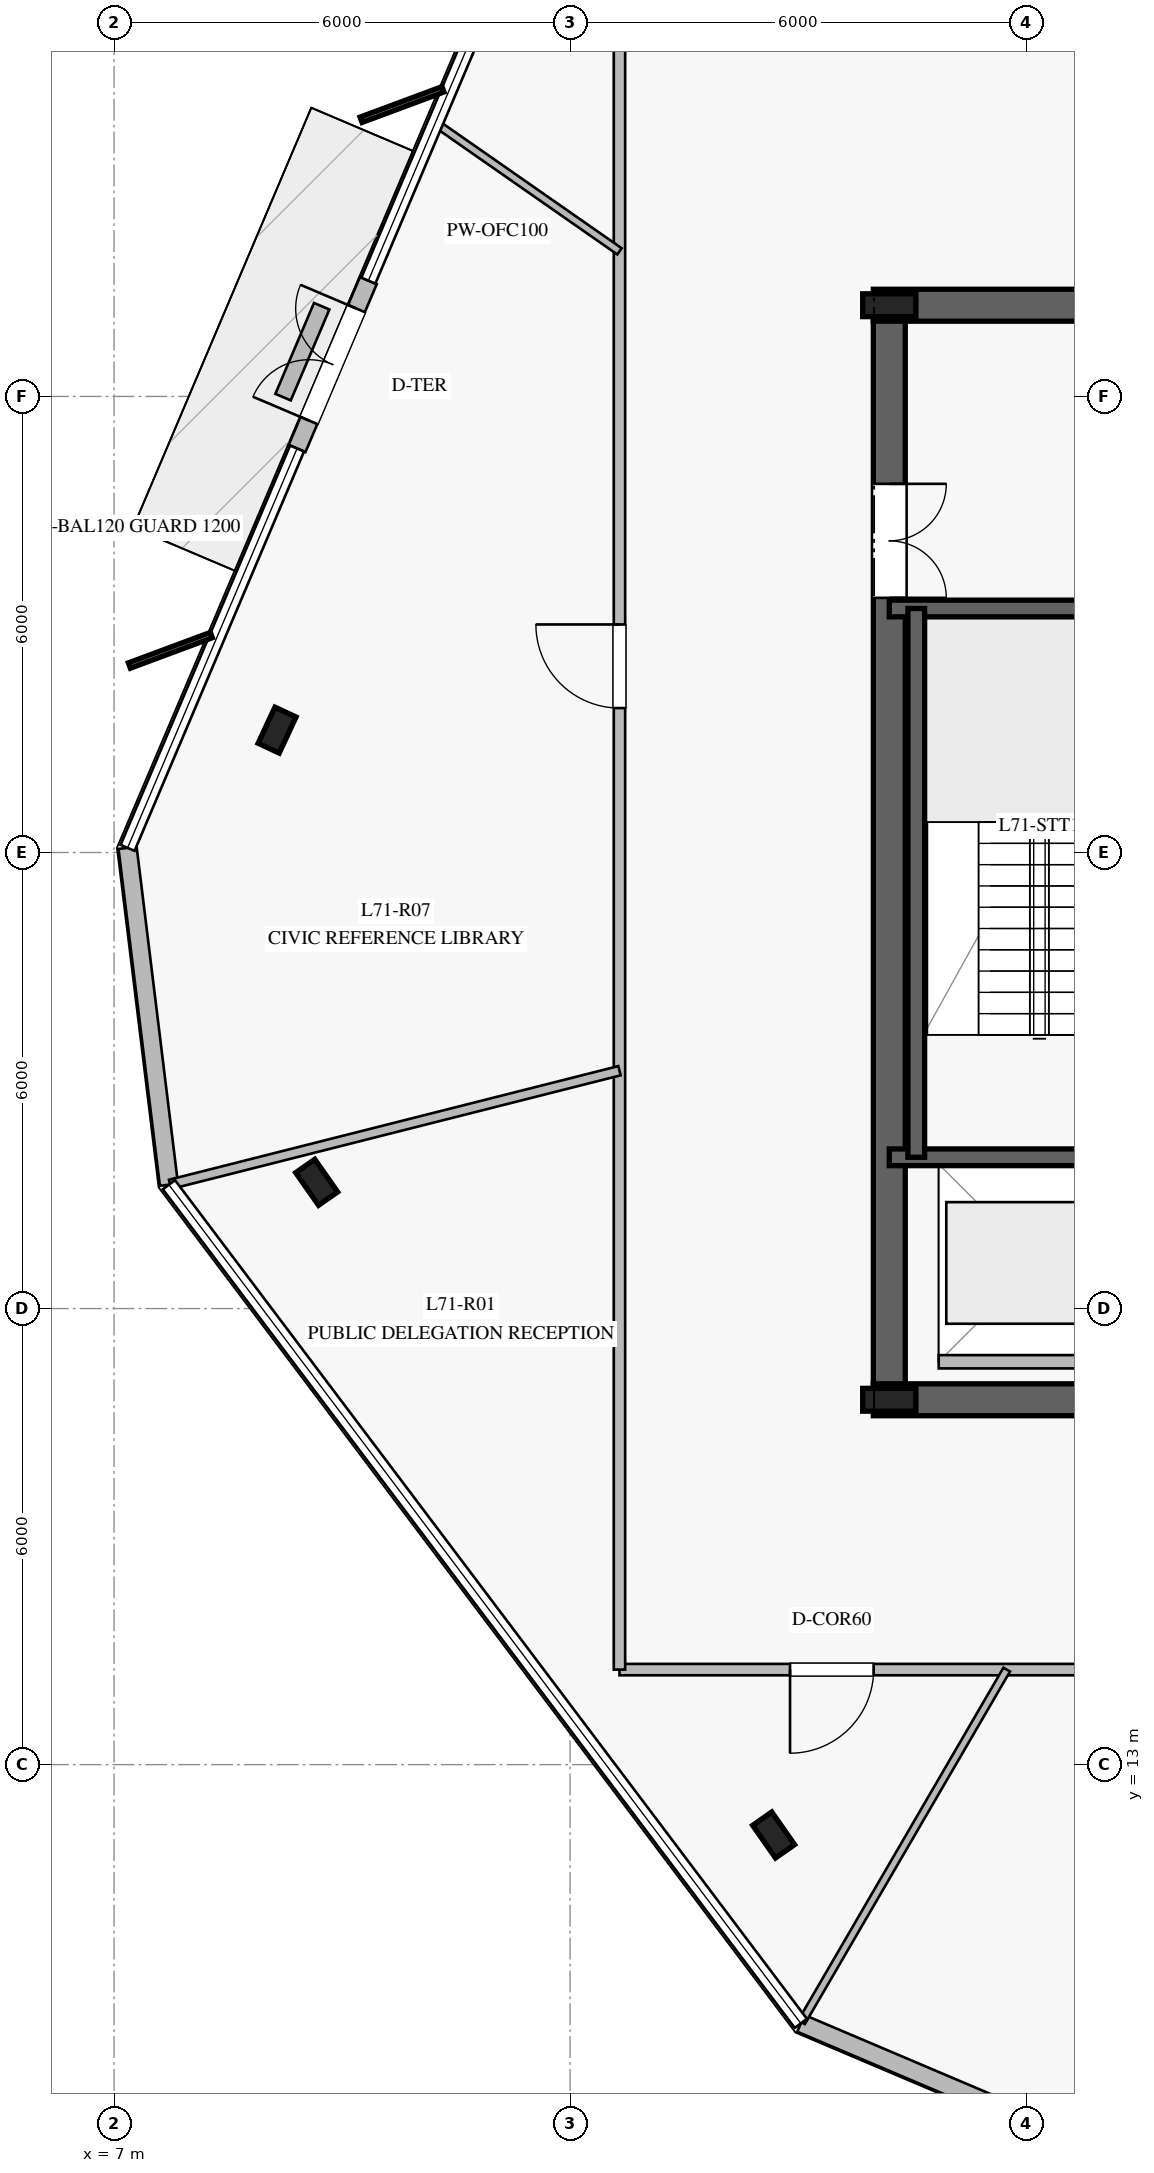
"""IFC4 building model, lengths in metres.
Left out: names, types, materials, properties, quantities, classifications, styles, units other than length and angle.
Written with IfcOpenShell. Run it as: python <this file> out.ifc"""

import sys

from ifc_helpers import new_model, si_unit, direction, frame, frame_2d, origin, origin_2d, place, context, subcontext, project, spatial, rectangle, i_section, extrude, element, fill, save


model = new_model("IFC4")
c1 = context("Model", 3, precision=1e-05, world=origin(), true_north=direction((0.0, 1.0)))
c2 = subcontext(c1, "Body", "Model", "MODEL_VIEW")
j1 = project(units=[si_unit("LENGTHUNIT", "METRE"), si_unit("PLANEANGLEUNIT", "RADIAN")], contexts=[c1])
p1 = place(None, origin())
s1 = spatial("IfcSite", under=j1, at=p1, CompositionType="ELEMENT")
p2 = place(p1, origin())
s2 = spatial("IfcBuilding", under=s1, at=p2, CompositionType="ELEMENT")
p3 = place(p2, frame((0.0, 0.0, 294.2)))
s3 = spatial("IfcBuildingStorey", under=s2, at=p3, CompositionType="ELEMENT", Elevation=294.2)
p4 = place(p3, frame((16.99, 17.8, 0.0), z_axis=(0.0, 0.0, 1.0), x_axis=(1.0, 0.0, 0.0)))
e1 = element("IfcWall", 1, at=p4, inside=s3, PredefinedType="SHEAR", context=c2, shape_type="SweptSolid", body=[
    extrude(rectangle(XDim=16.02, YDim=0.42, at=frame_2d((8.01, 0.0))), origin(), (0.0, 0.0, 1.0), 3.78),
])
p5 = place(p4, frame((4.96, 0.0, 0.0)))
e2 = element("IfcOpeningElement", 2, at=p5, cuts=e1, PredefinedType="OPENING", context=c2, shape_type="SweptSolid", body=[
    extrude(rectangle(XDim=1.2, YDim=2.25, at=frame_2d((0.6, 1.125))), frame((0.0, 0.22, 0.0), z_axis=(0.0, -1.0, 0.0), x_axis=(1.0, 0.0, 0.0)), (0.0, 0.0, 1.0), 0.44),
])
p6 = place(p4, frame((13.91, 0.0, 0.0)))
e3 = element("IfcOpeningElement", 3, at=p6, cuts=e1, PredefinedType="OPENING", context=c2, shape_type="SweptSolid", body=[
    extrude(rectangle(XDim=0.9, YDim=2.1, at=frame_2d((0.45, 1.05))), frame((0.0, 0.22, 0.0), z_axis=(0.0, -1.0, 0.0), x_axis=(1.0, 0.0, 0.0)), (0.0, 0.0, 1.0), 0.44),
])
p7 = place(p4, frame((9.16, 0.0, 0.0)))
e4 = element("IfcOpeningElement", 4, at=p7, cuts=e1, PredefinedType="OPENING", context=c2, shape_type="SweptSolid", body=[
    extrude(rectangle(XDim=1.1, YDim=2.2, at=frame_2d((0.55, 1.1))), frame((0.0, 0.22, 0.0), z_axis=(0.0, -1.0, 0.0), x_axis=(1.0, 0.0, 0.0)), (0.0, 0.0, 1.0), 0.44),
])
p8 = place(p3, frame((33.01, 32.2, 0.0), z_axis=(0.0, 0.0, 1.0), x_axis=(-1.0, 0.0, 0.0)))
e5 = element("IfcWall", 5, at=p8, inside=s3, PredefinedType="SHEAR", context=c2, shape_type="SweptSolid", body=[
    extrude(rectangle(XDim=16.02, YDim=0.42, at=frame_2d((8.01, 0.0))), origin(), (0.0, 0.0, 1.0), 3.78),
])
p9 = place(p8, frame((4.96, 0.0, 0.0)))
e6 = element("IfcOpeningElement", 6, at=p9, cuts=e5, PredefinedType="OPENING", context=c2, shape_type="SweptSolid", body=[
    extrude(rectangle(XDim=1.2, YDim=2.25, at=frame_2d((0.6, 1.125))), frame((0.0, 0.22, 0.0), z_axis=(0.0, -1.0, 0.0), x_axis=(1.0, 0.0, 0.0)), (0.0, 0.0, 1.0), 0.44),
])
p10 = place(p8, frame((9.785, 0.0, 0.0)))
e7 = element("IfcOpeningElement", 7, at=p10, cuts=e5, PredefinedType="OPENING", context=c2, shape_type="SweptSolid", body=[
    extrude(rectangle(XDim=1.1, YDim=2.2, at=frame_2d((0.55, 1.1))), frame((0.0, 0.22, 0.0), z_axis=(0.0, -1.0, 0.0), x_axis=(1.0, 0.0, 0.0)), (0.0, 0.0, 1.0), 0.44),
])
p11 = place(p3, frame((17.2, 31.99, 0.0), z_axis=(0.0, 0.0, 1.0), x_axis=(0.0, -1.0, 0.0)))
e8 = element("IfcWall", 8, at=p11, inside=s3, PredefinedType="SHEAR", context=c2, shape_type="SweptSolid", body=[
    extrude(rectangle(XDim=13.98, YDim=0.42, at=frame_2d((6.99, 0.0))), origin(), (0.0, 0.0, 1.0), 3.78),
])
p12 = place(p11, frame((2.14, 0.0, 0.0)))
e9 = element("IfcOpeningElement", 9, at=p12, cuts=e8, PredefinedType="OPENING", context=c2, shape_type="SweptSolid", body=[
    extrude(rectangle(XDim=1.5, YDim=2.2, at=frame_2d((0.75, 1.1))), frame((0.0, 0.22, 0.0), z_axis=(0.0, -1.0, 0.0), x_axis=(1.0, 0.0, 0.0)), (0.0, 0.0, 1.0), 0.44),
])
for number, where, z_axis, x_axis in (
    (10, (17.2, 17.8, 0.0), (0.0, 0.0, 1.0), (1.0, 0.0, 0.0)),
    (11, (17.2, 32.2, 0.0), (0.0, 0.0, 1.0), (1.0, 0.0, 0.0)),
):
    element("IfcColumn", number, at=place(p3, frame(where, z_axis=z_axis, x_axis=x_axis)), inside=s3, PredefinedType="COLUMN", context=c2, shape_type="SweptSolid", body=[
        extrude(i_section(OverallWidth=0.3, OverallDepth=0.7, WebThickness=0.017, FlangeThickness=0.032, at=origin_2d()), origin(), (0.0, 0.0, 1.0), 4.0),
    ])
for number, where, z_axis, x_axis in (
    (12, (17.2, 20.99, 0.0), (0.0, 0.0, 1.0), (1.0, 0.0, 0.0)),
    (13, (17.2, 28.21, 0.0), (0.0, 0.0, 1.0), (1.0, 0.0, 0.0)),
):
    element("IfcWall", number, at=place(p3, frame(where, z_axis=z_axis, x_axis=x_axis)), inside=s3, PredefinedType="SOLIDWALL", context=c2, shape_type="SweptSolid", body=[
        extrude(rectangle(XDim=3.72, YDim=0.22, at=frame_2d((1.86, 0.0))), origin(), (0.0, 0.0, 1.0), 3.78),
    ])
p13 = place(p3, frame((17.555, 28.21, 0.0), z_axis=(0.0, 0.0, 1.0), x_axis=(0.0, -1.0, 0.0)))
e14 = element("IfcWall", 14, at=p13, inside=s3, PredefinedType="SOLIDWALL", context=c2, shape_type="SweptSolid", body=[
    extrude(rectangle(XDim=7.22, YDim=0.22, at=frame_2d((3.61, 0.0))), origin(), (0.0, 0.0, 1.0), 3.78),
])
for number, where, z_axis, x_axis in (
    (15, (9.145, 26.61, 0.0), (0.0, 0.0, 1.0), (0.423, 0.906, 0.0)),
    (16, (9.666, 20.661, 0.0), (0.0, 0.0, 1.0), (-0.574, 0.819, 0.0)),
    (17, (15.678, 12.074, 0.0), (0.0, 0.0, 1.0), (-0.574, 0.819, 0.0)),
):
    element("IfcColumn", number, at=place(p3, frame(where, z_axis=z_axis, x_axis=x_axis)), inside=s3, PredefinedType="COLUMN", context=c2, shape_type="SweptSolid", body=[
        extrude(i_section(OverallWidth=0.306, OverallDepth=0.524, WebThickness=0.021, FlangeThickness=0.04, at=origin_2d()), origin(), (0.0, 0.0, 1.0), 4.0),
    ])
p14 = place(p3, frame((10.346, 32.524, 0.0), z_axis=(0.0, 0.0, 1.0), x_axis=(-0.390847654615, -0.920455382342, 0.0)))
e18 = element("IfcWall", 18, at=p14, inside=s3, PredefinedType="STANDARD", context=c2, shape_type="SweptSolid", body=[
    extrude(rectangle(XDim=2.4, YDim=0.24, at=frame_2d((1.2, 0.0))), origin(), (0.0, 0.0, 1.0), 3.78),
])
p15 = place(p14, frame((0.4, 0.0, 0.0)))
e19 = element("IfcOpeningElement", 19, at=p15, cuts=e18, PredefinedType="OPENING", context=c2, shape_type="SweptSolid", body=[
    extrude(rectangle(XDim=1.6, YDim=2.25, at=frame_2d((0.8, 1.125))), frame((0.0, 0.13, 0.0), z_axis=(0.0, -1.0, 0.0), x_axis=(1.0, 0.0, 0.0)), (0.0, 0.0, 1.0), 0.26),
])
p16 = place(p3, frame((7.178, 25.061, 0.0), z_axis=(0.0, 0.0, 1.0), x_axis=(0.121813815836, -0.992552967993, 0.0)))
e20 = element("IfcWall", 20, at=p16, inside=s3, PredefinedType="STANDARD", context=c2, shape_type="SweptSolid", body=[
    extrude(rectangle(XDim=4.465, YDim=0.24, at=frame_2d((2.233, 0.0))), origin(), (0.0, 0.0, 1.0), 3.78),
])
p17 = place(p3, frame((16.036, 9.596, 0.0), z_axis=(0.0, 0.0, 1.0), x_axis=(0.92048584613, -0.390775903908, 0.0)))
e21 = element("IfcWall", 21, at=p17, inside=s3, PredefinedType="STANDARD", context=c2, shape_type="SweptSolid", body=[
    extrude(rectangle(XDim=4.465, YDim=0.24, at=frame_2d((2.232, 0.0))), origin(), (0.0, 0.0, 1.0), 3.78),
])
p18 = place(p3, frame((9.732, 32.187, 0.0), z_axis=(0.0, 0.0, 1.0), x_axis=(-0.390810390969, -0.920471204498, 0.0)))
e22 = element("IfcWall", 22, at=p18, inside=s3, PredefinedType="USERDEFINED", context=c2, shape_type="SweptSolid", body=[
    extrude(rectangle(XDim=1.299, YDim=0.22, at=frame_2d((0.65, 0.0))), origin(), (0.0, 0.0, 1.0), 0.4),
])
p19 = place(p3, frame((17.85, 18.3, 0.0), z_axis=(0.0, 0.0, 1.0), x_axis=(1.0, 0.0, 0.0)))
e23 = element("IfcWall", 23, at=p19, inside=s3, PredefinedType="PARTITIONING", context=c2, shape_type="SweptSolid", body=[
    extrude(rectangle(XDim=2.6, YDim=0.175, at=frame_2d((1.3, 0.0))), origin(), (0.0, 0.0, 1.0), 3.78),
])
p20 = place(p3, frame((36.35, 14.25, 0.0), z_axis=(0.0, 0.0, 1.0), x_axis=(-1.0, 0.0, 0.0)))
e24 = element("IfcWall", 24, at=p20, inside=s3, PredefinedType="PARTITIONING", context=c2, shape_type="SweptSolid", body=[
    extrude(rectangle(XDim=22.7, YDim=0.15, at=frame_2d((11.35, 0.0))), origin(), (0.0, 0.0, 1.0), 3.28),
])
p21 = place(p20, frame((19.356, 0.0, 0.0)))
e25 = element("IfcOpeningElement", 25, at=p21, cuts=e24, PredefinedType="OPENING", context=c2, shape_type="SweptSolid", body=[
    extrude(rectangle(XDim=1.1, YDim=2.2, at=frame_2d((0.55, 1.1))), frame((0.0, 0.085, 0.0), z_axis=(0.0, -1.0, 0.0), x_axis=(1.0, 0.0, 0.0)), (0.0, 0.0, 1.0), 0.17),
])
p22 = place(p20, frame((10.849, 0.0, 0.0)))
e26 = element("IfcOpeningElement", 26, at=p22, cuts=e24, PredefinedType="OPENING", context=c2, shape_type="SweptSolid", body=[
    extrude(rectangle(XDim=1.1, YDim=2.2, at=frame_2d((0.55, 1.1))), frame((0.0, 0.085, 0.0), z_axis=(0.0, -1.0, 0.0), x_axis=(1.0, 0.0, 0.0)), (0.0, 0.0, 1.0), 0.17),
])
p23 = place(p3, frame((13.65, 14.25, 0.0), z_axis=(0.0, 0.0, 1.0), x_axis=(0.0, 1.0, 0.0)))
e27 = element("IfcWall", 27, at=p23, inside=s3, PredefinedType="PARTITIONING", context=c2, shape_type="SweptSolid", body=[
    extrude(rectangle(XDim=21.5, YDim=0.15, at=frame_2d((10.75, 0.0))), origin(), (0.0, 0.0, 1.0), 3.05),
])
p24 = place(p23, frame((12.65, 0.0, 0.0)))
e28 = element("IfcOpeningElement", 28, at=p24, cuts=e27, PredefinedType="OPENING", context=c2, shape_type="SweptSolid", body=[
    extrude(rectangle(XDim=1.1, YDim=2.2, at=frame_2d((0.55, 1.1))), frame((0.0, 0.085, 0.0), z_axis=(0.0, -1.0, 0.0), x_axis=(1.0, 0.0, 0.0)), (0.0, 0.0, 1.0), 0.17),
])
p25 = place(p3, frame((13.65, 32.909, 0.0), z_axis=(0.0, 0.0, 1.0), x_axis=(-0.820311921153, 0.57191638551, 0.0)))
e29 = element("IfcWall", 29, at=p25, inside=s3, PredefinedType="MOVABLE", context=c2, shape_type="SweptSolid", body=[
    extrude(rectangle(XDim=2.938, YDim=0.1, at=frame_2d((1.469, 0.0))), origin(), (0.0, 0.0, 1.0), 3.28),
])
p26 = place(p3, frame((13.65, 22.129, 0.0), z_axis=(0.0, 0.0, 1.0), x_axis=(-0.969486629442, -0.245144192941, 0.0)))
e30 = element("IfcWall", 30, at=p26, inside=s3, PredefinedType="PARTITIONING", context=c2, shape_type="SweptSolid", body=[
    extrude(rectangle(XDim=6.098, YDim=0.125, at=frame_2d((3.049, 0.0))), origin(), (0.0, 0.0, 1.0), 3.28),
])
p27 = place(p3, frame((18.745, 14.25, 0.0), z_axis=(0.0, 0.0, 1.0), x_axis=(-0.50305915127, -0.864251983118, 0.0)))
e31 = element("IfcWall", 31, at=p27, inside=s3, PredefinedType="MOVABLE", context=c2, shape_type="SweptSolid", body=[
    extrude(rectangle(XDim=5.367, YDim=0.1, at=frame_2d((2.684, 0.0))), origin(), (0.0, 0.0, 1.0), 3.28),
])
p28 = place(p15, frame((1.6, 0.0, 0.0), z_axis=(0.0, 0.0, 1.0), x_axis=(-1.0, 0.0, 0.0)))
e32 = element("IfcDoor", 32, at=p28, inside=s3, OperationType="DOUBLE_DOOR_SINGLE_SWING", PredefinedType="DOOR", context=c2, shape_type="SweptSolid", body=[
    extrude(rectangle(XDim=1.6, YDim=2.25, at=frame_2d((0.8, 1.125))), frame((0.0, 0.025, 0.0), z_axis=(0.0, -1.0, 0.0), x_axis=(1.0, 0.0, 0.0)), (0.0, 0.0, 1.0), 0.05),
])
fill(e19, e32)
p29 = place(p12, origin())
e33 = element("IfcDoor", 33, at=p29, inside=s3, OperationType="DOUBLE_DOOR_SINGLE_SWING", PredefinedType="DOOR", context=c2, shape_type="SweptSolid", body=[
    extrude(rectangle(XDim=1.5, YDim=2.2, at=frame_2d((0.75, 1.1))), frame((0.0, 0.025, 0.0), z_axis=(0.0, -1.0, 0.0), x_axis=(1.0, 0.0, 0.0)), (0.0, 0.0, 1.0), 0.05),
])
fill(e9, e33)
p30 = place(p21, origin())
e34 = element("IfcDoor", 34, at=p30, inside=s3, OperationType="SINGLE_SWING_RIGHT", PredefinedType="DOOR", context=c2, shape_type="SweptSolid", body=[
    extrude(rectangle(XDim=1.1, YDim=2.2, at=frame_2d((0.55, 1.1))), frame((0.0, 0.025, 0.0), z_axis=(0.0, -1.0, 0.0), x_axis=(1.0, 0.0, 0.0)), (0.0, 0.0, 1.0), 0.05),
])
fill(e25, e34)
p31 = place(p24, origin())
e35 = element("IfcDoor", 35, at=p31, inside=s3, OperationType="SINGLE_SWING_RIGHT", PredefinedType="DOOR", context=c2, shape_type="SweptSolid", body=[
    extrude(rectangle(XDim=1.1, YDim=2.2, at=frame_2d((0.55, 1.1))), frame((0.0, 0.025, 0.0), z_axis=(0.0, -1.0, 0.0), x_axis=(1.0, 0.0, 0.0)), (0.0, 0.0, 1.0), 0.05),
])
fill(e28, e35)
save(model, sys.argv[1])
